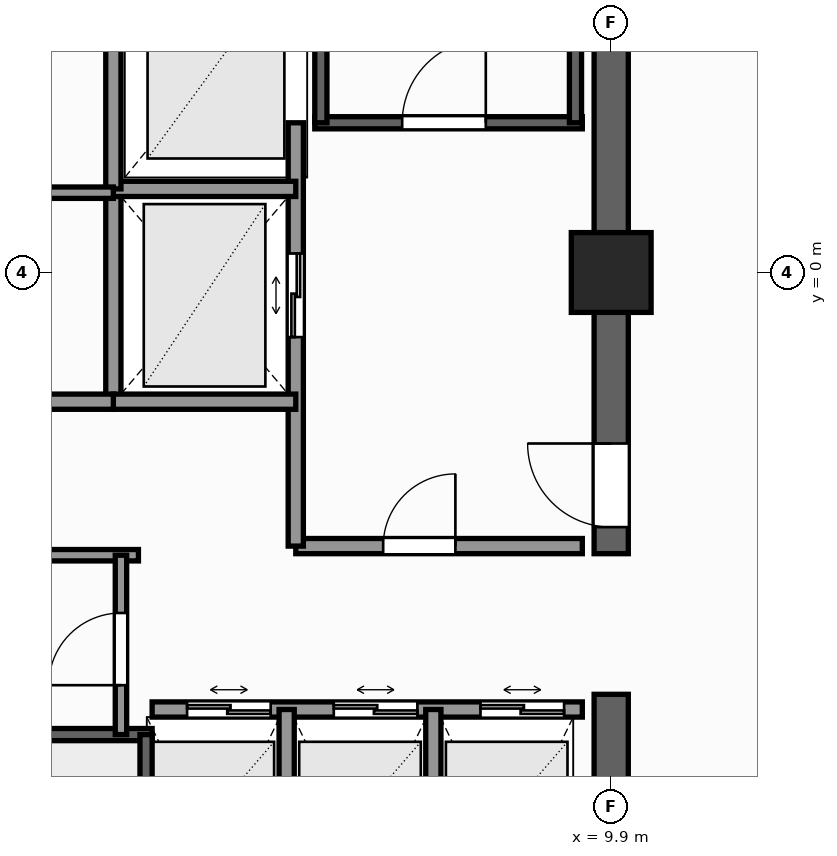
"""IFC4 building model, lengths in metres.
Left out: names, types, materials, properties, quantities, classifications, styles, units other than length and angle.
Written with IfcOpenShell. Run it as: python <this file> out.ifc"""

import sys

from ifc_helpers import new_model, si_unit, direction, frame, frame_2d, origin, origin_2d, place, context, subcontext, project, spatial, rectangle, extrude, element, fill, save


model = new_model("IFC4")
c1 = context("Model", 3, precision=1e-05, world=origin(), true_north=direction((0.0, 1.0)))
c2 = subcontext(c1, "Body", "Model", "MODEL_VIEW")
j1 = project(units=[si_unit("LENGTHUNIT", "METRE"), si_unit("PLANEANGLEUNIT", "RADIAN")], contexts=[c1])
p1 = place(None, origin())
s1 = spatial("IfcSite", under=j1, at=p1, CompositionType="ELEMENT")
p2 = place(p1, origin())
s2 = spatial("IfcBuilding", under=s1, at=p2, CompositionType="ELEMENT")
p3 = place(p2, frame((0.0, 0.0, 267.4)))
s3 = spatial("IfcBuildingStorey", under=s2, at=p3, CompositionType="ELEMENT", Elevation=267.4)
p4 = place(p3, frame((9.9, -9.675, 0.0), z_axis=(0.0, 0.0, 1.0), x_axis=(0.0, 1.0, 0.0)))
e1 = element("IfcWall", 1, at=p4, inside=s3, PredefinedType="SHEAR", context=c2, shape_type="SweptSolid", body=[
    extrude(rectangle(XDim=4.125, YDim=0.45, at=frame_2d((2.062, 0.0))), origin(), (0.0, 0.0, 1.0), 5.0),
])
p5 = place(p3, frame((9.9, -3.7, 0.0), z_axis=(0.0, 0.0, 1.0), x_axis=(0.0, 1.0, 0.0)))
e2 = element("IfcWall", 2, at=p5, inside=s3, PredefinedType="SHEAR", context=c2, shape_type="SweptSolid", body=[
    extrude(rectangle(XDim=13.375, YDim=0.45, at=frame_2d((6.688, 0.0))), origin(), (0.0, 0.0, 1.0), 5.0),
])
p6 = place(p5, frame((0.35, 0.0, 0.0)))
e3 = element("IfcOpeningElement", 3, at=p6, cuts=e2, PredefinedType="OPENING", context=c2, shape_type="SweptSolid", body=[
    extrude(rectangle(XDim=1.1, YDim=2.2, at=frame_2d((0.55, 1.1))), frame((0.0, 0.235, 0.0), z_axis=(0.0, -1.0, 0.0), x_axis=(1.0, 0.0, 0.0)), (0.0, 0.0, 1.0), 0.47),
])
p7 = place(p3, frame((9.9, 0.0, 0.0), z_axis=(0.0, 0.0, 1.0), x_axis=(1.0, 0.0, 0.0)))
e4 = element("IfcColumn", 4, at=p7, inside=s3, PredefinedType="COLUMN", context=c2, shape_type="SweptSolid", body=[
    extrude(rectangle(XDim=1.05, YDim=1.05, at=origin_2d()), origin(), (0.0, 0.0, 1.0), 5.0),
])
p8 = place(p3, frame((6.0, 1.97, 0.0), z_axis=(0.0, 0.0, 1.0), x_axis=(1.0, 0.0, 0.0)))
e5 = element("IfcWall", 5, at=p8, inside=s3, PredefinedType="SHEAR", context=c2, shape_type="SweptSolid", body=[
    extrude(rectangle(XDim=3.52, YDim=0.16, at=frame_2d((1.76, 0.0))), origin(), (0.0, 0.0, 1.0), 5.0),
])
p9 = place(p8, frame((1.15, 0.0, 0.0)))
e6 = element("IfcOpeningElement", 6, at=p9, cuts=e5, PredefinedType="OPENING", context=c2, shape_type="SweptSolid", body=[
    extrude(rectangle(XDim=1.1, YDim=2.2, at=frame_2d((0.55, 1.1))), frame((0.0, 0.09, 0.0), z_axis=(0.0, -1.0, 0.0), x_axis=(1.0, 0.0, 0.0)), (0.0, 0.0, 1.0), 0.18),
])
for number, where, z_axis, x_axis in (
    (7, (6.08, 1.97, 0.0), (0.0, 0.0, 1.0), (0.0, 1.0, 0.0)),
    (8, (9.43, 1.97, 0.0), (0.0, 0.0, 1.0), (0.0, 1.0, 0.0)),
):
    element("IfcWall", number, at=place(p3, frame(where, z_axis=z_axis, x_axis=x_axis)), inside=s3, PredefinedType="SHEAR", context=c2, shape_type="SweptSolid", body=[
        extrude(rectangle(XDim=7.56, YDim=0.16, at=frame_2d((3.78, 0.0))), origin(), (0.0, 0.0, 1.0), 5.0),
    ])
p10 = place(p3, frame((-3.86, -6.08, 0.0), z_axis=(0.0, 0.0, 1.0), x_axis=(1.0, 0.0, 0.0)))
e9 = element("IfcWall", 9, at=p10, inside=s3, PredefinedType="SHEAR", context=c2, shape_type="SweptSolid", body=[
    extrude(rectangle(XDim=7.72, YDim=0.16, at=frame_2d((3.86, 0.0))), origin(), (0.0, 0.0, 1.0), 5.0),
])
p11 = place(p3, frame((3.78, -9.43, 0.0), z_axis=(0.0, 0.0, 1.0), x_axis=(0.0, 1.0, 0.0)))
e10 = element("IfcWall", 10, at=p11, inside=s3, PredefinedType="SHEAR", context=c2, shape_type="SweptSolid", body=[
    extrude(rectangle(XDim=3.35, YDim=0.16, at=frame_2d((1.675, 0.0))), origin(), (0.0, 0.0, 1.0), 5.0),
])
p12 = place(p3, frame((5.75, -3.6, 0.0), z_axis=(0.0, 0.0, 1.0), x_axis=(1.0, 0.0, 0.0)))
e11 = element("IfcWall", 11, at=p12, inside=s3, PredefinedType="SOLIDWALL", context=c2, shape_type="SweptSolid", body=[
    extrude(rectangle(XDim=3.77, YDim=0.2, at=frame_2d((1.885, 0.0))), origin(), (0.0, 0.0, 1.0), 4.7),
])
p13 = place(p12, frame((1.15, 0.0, 0.0)))
e12 = element("IfcOpeningElement", 12, at=p13, cuts=e11, PredefinedType="OPENING", context=c2, shape_type="SweptSolid", body=[
    extrude(rectangle(XDim=0.95, YDim=2.06, at=frame_2d((0.475, 1.03))), frame((0.0, 0.11, 0.0), z_axis=(0.0, -1.0, 0.0), x_axis=(1.0, 0.0, 0.0)), (0.0, 0.0, 1.0), 0.22),
])
p14 = place(p3, frame((5.75, -3.6, 0.0), z_axis=(0.0, 0.0, 1.0), x_axis=(0.0, 1.0, 0.0)))
e13 = element("IfcWall", 13, at=p14, inside=s3, PredefinedType="SOLIDWALL", context=c2, shape_type="SweptSolid", body=[
    extrude(rectangle(XDim=5.57, YDim=0.2, at=frame_2d((2.785, 0.0))), origin(), (0.0, 0.0, 1.0), 4.7),
])
p15 = place(p14, frame((2.75, 0.0, 0.0)))
e14 = element("IfcOpeningElement", 14, at=p15, cuts=e13, PredefinedType="OPENING", context=c2, shape_type="SweptSolid", body=[
    extrude(rectangle(XDim=1.1, YDim=2.2, at=frame_2d((0.55, 1.1))), frame((0.0, 0.11, 0.0), z_axis=(0.0, -1.0, 0.0), x_axis=(1.0, 0.0, 0.0)), (0.0, 0.0, 1.0), 0.22),
])
p16 = place(p3, frame((3.35, -1.7, 0.0), z_axis=(0.0, 0.0, 1.0), x_axis=(0.0, 1.0, 0.0)))
e15 = element("IfcWall", 15, at=p16, inside=s3, PredefinedType="SOLIDWALL", context=c2, shape_type="SweptSolid", body=[
    extrude(rectangle(XDim=2.8, YDim=0.2, at=frame_2d((1.4, 0.0))), origin(), (0.0, 0.0, 1.0), 4.7),
])
for number, where, z_axis, x_axis in (
    (16, (3.35, -1.7, 0.0), (0.0, 0.0, 1.0), (1.0, 0.0, 0.0)),
    (17, (3.35, 1.1, 0.0), (0.0, 0.0, 1.0), (1.0, 0.0, 0.0)),
):
    element("IfcWall", number, at=place(p3, frame(where, z_axis=z_axis, x_axis=x_axis)), inside=s3, PredefinedType="SOLIDWALL", context=c2, shape_type="SweptSolid", body=[
        extrude(rectangle(XDim=2.4, YDim=0.2, at=frame_2d((1.2, 0.0))), origin(), (0.0, 0.0, 1.0), 4.7),
    ])
p17 = place(p3, frame((3.86, -5.75, 0.0), z_axis=(0.0, 0.0, 1.0), x_axis=(1.0, 0.0, 0.0)))
e18 = element("IfcWall", 18, at=p17, inside=s3, PredefinedType="SOLIDWALL", context=c2, shape_type="SweptSolid", body=[
    extrude(rectangle(XDim=5.66, YDim=0.2, at=frame_2d((2.83, 0.0))), origin(), (0.0, 0.0, 1.0), 4.7),
])
p18 = place(p17, frame((0.46, 0.0, 0.0)))
e19 = element("IfcOpeningElement", 19, at=p18, cuts=e18, PredefinedType="OPENING", context=c2, shape_type="SweptSolid", body=[
    extrude(rectangle(XDim=1.1, YDim=2.2, at=frame_2d((0.55, 1.1))), frame((0.0, 0.11, 0.0), z_axis=(0.0, -1.0, 0.0), x_axis=(1.0, 0.0, 0.0)), (0.0, 0.0, 1.0), 0.22),
])
p19 = place(p17, frame((2.39, 0.0, 0.0)))
e20 = element("IfcOpeningElement", 20, at=p19, cuts=e18, PredefinedType="OPENING", context=c2, shape_type="SweptSolid", body=[
    extrude(rectangle(XDim=1.1, YDim=2.2, at=frame_2d((0.55, 1.1))), frame((0.0, 0.11, 0.0), z_axis=(0.0, -1.0, 0.0), x_axis=(1.0, 0.0, 0.0)), (0.0, 0.0, 1.0), 0.22),
])
p20 = place(p17, frame((4.32, 0.0, 0.0)))
e21 = element("IfcOpeningElement", 21, at=p20, cuts=e18, PredefinedType="OPENING", context=c2, shape_type="SweptSolid", body=[
    extrude(rectangle(XDim=1.1, YDim=2.2, at=frame_2d((0.55, 1.1))), frame((0.0, 0.11, 0.0), z_axis=(0.0, -1.0, 0.0), x_axis=(1.0, 0.0, 0.0)), (0.0, 0.0, 1.0), 0.22),
])
for number, where, z_axis, x_axis in (
    (22, (5.63, -9.52, 0.0), (0.0, 0.0, 1.0), (0.0, 1.0, 0.0)),
    (23, (7.56, -9.52, 0.0), (0.0, 0.0, 1.0), (0.0, 1.0, 0.0)),
):
    element("IfcWall", number, at=place(p3, frame(where, z_axis=z_axis, x_axis=x_axis)), inside=s3, PredefinedType="SOLIDWALL", context=c2, shape_type="SweptSolid", body=[
        extrude(rectangle(XDim=3.77, YDim=0.2, at=frame_2d((1.885, 0.0))), origin(), (0.0, 0.0, 1.0), 4.7),
    ])
p21 = place(p3, frame((-3.35, -1.7, 0.0), z_axis=(0.0, 0.0, 1.0), x_axis=(1.0, 0.0, 0.0)))
e24 = element("IfcWall", 24, at=p21, inside=s3, PredefinedType="SOLIDWALL", context=c2, shape_type="SweptSolid", body=[
    extrude(rectangle(XDim=6.7, YDim=0.2, at=frame_2d((3.35, 0.0))), origin(), (0.0, 0.0, 1.0), 4.7),
])
p22 = place(p3, frame((3.35, 1.1, 0.0), z_axis=(0.0, 0.0, 1.0), x_axis=(0.0, 1.0, 0.0)))
e25 = element("IfcWall", 25, at=p22, inside=s3, PredefinedType="SOLIDWALL", context=c2, shape_type="SweptSolid", body=[
    extrude(rectangle(XDim=3.2, YDim=0.2, at=frame_2d((1.6, 0.0))), origin(), (0.0, 0.0, 1.0), 4.7),
])
p23 = place(p3, frame((-3.35, 1.05, 0.0), z_axis=(0.0, 0.0, 1.0), x_axis=(1.0, 0.0, 0.0)))
e26 = element("IfcWall", 26, at=p23, inside=s3, PredefinedType="PARTITIONING", context=c2, shape_type="SweptSolid", body=[
    extrude(rectangle(XDim=6.7, YDim=0.15, at=frame_2d((3.35, 0.0))), origin(), (0.0, 0.0, 1.0), 4.7),
])
p24 = place(p23, frame((4.2, 0.0, 0.0)))
e27 = element("IfcOpeningElement", 27, at=p24, cuts=e26, PredefinedType="OPENING", context=c2, shape_type="SweptSolid", body=[
    extrude(rectangle(XDim=0.85, YDim=2.03, at=frame_2d((0.425, 1.015))), frame((0.0, 0.085, 0.0), z_axis=(0.0, -1.0, 0.0), x_axis=(1.0, 0.0, 0.0)), (0.0, 0.0, 1.0), 0.17),
])
p25 = place(p3, frame((-3.68, -3.72, 0.0), z_axis=(0.0, 0.0, 1.0), x_axis=(1.0, 0.0, 0.0)))
e28 = element("IfcWall", 28, at=p25, inside=s3, PredefinedType="PARTITIONING", context=c2, shape_type="SweptSolid", body=[
    extrude(rectangle(XDim=7.36, YDim=0.15, at=frame_2d((3.68, 0.0))), origin(), (0.0, 0.0, 1.0), 4.7),
])
p26 = place(p3, frame((3.45, -6.08, 0.0), z_axis=(0.0, 0.0, 1.0), x_axis=(0.0, 1.0, 0.0)))
e29 = element("IfcWall", 29, at=p26, inside=s3, PredefinedType="PARTITIONING", context=c2, shape_type="SweptSolid", body=[
    extrude(rectangle(XDim=2.36, YDim=0.15, at=frame_2d((1.18, 0.0))), origin(), (0.0, 0.0, 1.0), 4.7),
])
p27 = place(p26, frame((0.65, 0.0, 0.0)))
e30 = element("IfcOpeningElement", 30, at=p27, cuts=e29, PredefinedType="OPENING", context=c2, shape_type="SweptSolid", body=[
    extrude(rectangle(XDim=0.95, YDim=2.06, at=frame_2d((0.475, 1.03))), frame((0.0, 0.085, 0.0), z_axis=(0.0, -1.0, 0.0), x_axis=(1.0, 0.0, 0.0)), (0.0, 0.0, 1.0), 0.17),
])
p28 = place(p9, origin())
e31 = element("IfcDoor", 31, at=p28, inside=s3, OperationType="SINGLE_SWING_RIGHT", PredefinedType="DOOR", context=c2, shape_type="SweptSolid", body=[
    extrude(rectangle(XDim=1.1, YDim=2.2, at=frame_2d((0.55, 1.1))), frame((0.0, 0.025, 0.0), z_axis=(0.0, -1.0, 0.0), x_axis=(1.0, 0.0, 0.0)), (0.0, 0.0, 1.0), 0.05),
])
fill(e6, e31)
p29 = place(p6, origin())
e32 = element("IfcDoor", 32, at=p29, inside=s3, OperationType="SINGLE_SWING_RIGHT", PredefinedType="DOOR", context=c2, shape_type="SweptSolid", body=[
    extrude(rectangle(XDim=1.1, YDim=2.2, at=frame_2d((0.55, 1.1))), frame((0.0, 0.025, 0.0), z_axis=(0.0, -1.0, 0.0), x_axis=(1.0, 0.0, 0.0)), (0.0, 0.0, 1.0), 0.05),
])
fill(e3, e32)
p30 = place(p15, origin())
e33 = element("IfcDoor", 33, at=p30, inside=s3, OperationType="DOUBLE_DOOR_SLIDING", PredefinedType="DOOR", context=c2, shape_type="SweptSolid", body=[
    extrude(rectangle(XDim=1.1, YDim=2.2, at=frame_2d((0.55, 1.1))), frame((0.0, 0.025, 0.0), z_axis=(0.0, -1.0, 0.0), x_axis=(1.0, 0.0, 0.0)), (0.0, 0.0, 1.0), 0.05),
])
fill(e14, e33)
p31 = place(p18, origin())
e34 = element("IfcDoor", 34, at=p31, inside=s3, OperationType="DOUBLE_DOOR_SLIDING", PredefinedType="DOOR", context=c2, shape_type="SweptSolid", body=[
    extrude(rectangle(XDim=1.1, YDim=2.2, at=frame_2d((0.55, 1.1))), frame((0.0, 0.025, 0.0), z_axis=(0.0, -1.0, 0.0), x_axis=(1.0, 0.0, 0.0)), (0.0, 0.0, 1.0), 0.05),
])
fill(e19, e34)
p32 = place(p19, origin())
e35 = element("IfcDoor", 35, at=p32, inside=s3, OperationType="DOUBLE_DOOR_SLIDING", PredefinedType="DOOR", context=c2, shape_type="SweptSolid", body=[
    extrude(rectangle(XDim=1.1, YDim=2.2, at=frame_2d((0.55, 1.1))), frame((0.0, 0.025, 0.0), z_axis=(0.0, -1.0, 0.0), x_axis=(1.0, 0.0, 0.0)), (0.0, 0.0, 1.0), 0.05),
])
fill(e20, e35)
p33 = place(p20, origin())
e36 = element("IfcDoor", 36, at=p33, inside=s3, OperationType="DOUBLE_DOOR_SLIDING", PredefinedType="DOOR", context=c2, shape_type="SweptSolid", body=[
    extrude(rectangle(XDim=1.1, YDim=2.2, at=frame_2d((0.55, 1.1))), frame((0.0, 0.025, 0.0), z_axis=(0.0, -1.0, 0.0), x_axis=(1.0, 0.0, 0.0)), (0.0, 0.0, 1.0), 0.05),
])
fill(e21, e36)
p34 = place(p13, origin())
e37 = element("IfcDoor", 37, at=p34, inside=s3, OperationType="SINGLE_SWING_RIGHT", PredefinedType="DOOR", context=c2, shape_type="SweptSolid", body=[
    extrude(rectangle(XDim=0.95, YDim=2.06, at=frame_2d((0.475, 1.03))), frame((0.0, 0.025, 0.0), z_axis=(0.0, -1.0, 0.0), x_axis=(1.0, 0.0, 0.0)), (0.0, 0.0, 1.0), 0.05),
])
fill(e12, e37)
p35 = place(p27, origin())
e38 = element("IfcDoor", 38, at=p35, inside=s3, OperationType="SINGLE_SWING_LEFT", PredefinedType="DOOR", context=c2, shape_type="SweptSolid", body=[
    extrude(rectangle(XDim=0.95, YDim=2.06, at=frame_2d((0.475, 1.03))), frame((0.0, 0.025, 0.0), z_axis=(0.0, -1.0, 0.0), x_axis=(1.0, 0.0, 0.0)), (0.0, 0.0, 1.0), 0.05),
])
fill(e30, e38)
save(model, sys.argv[1])
